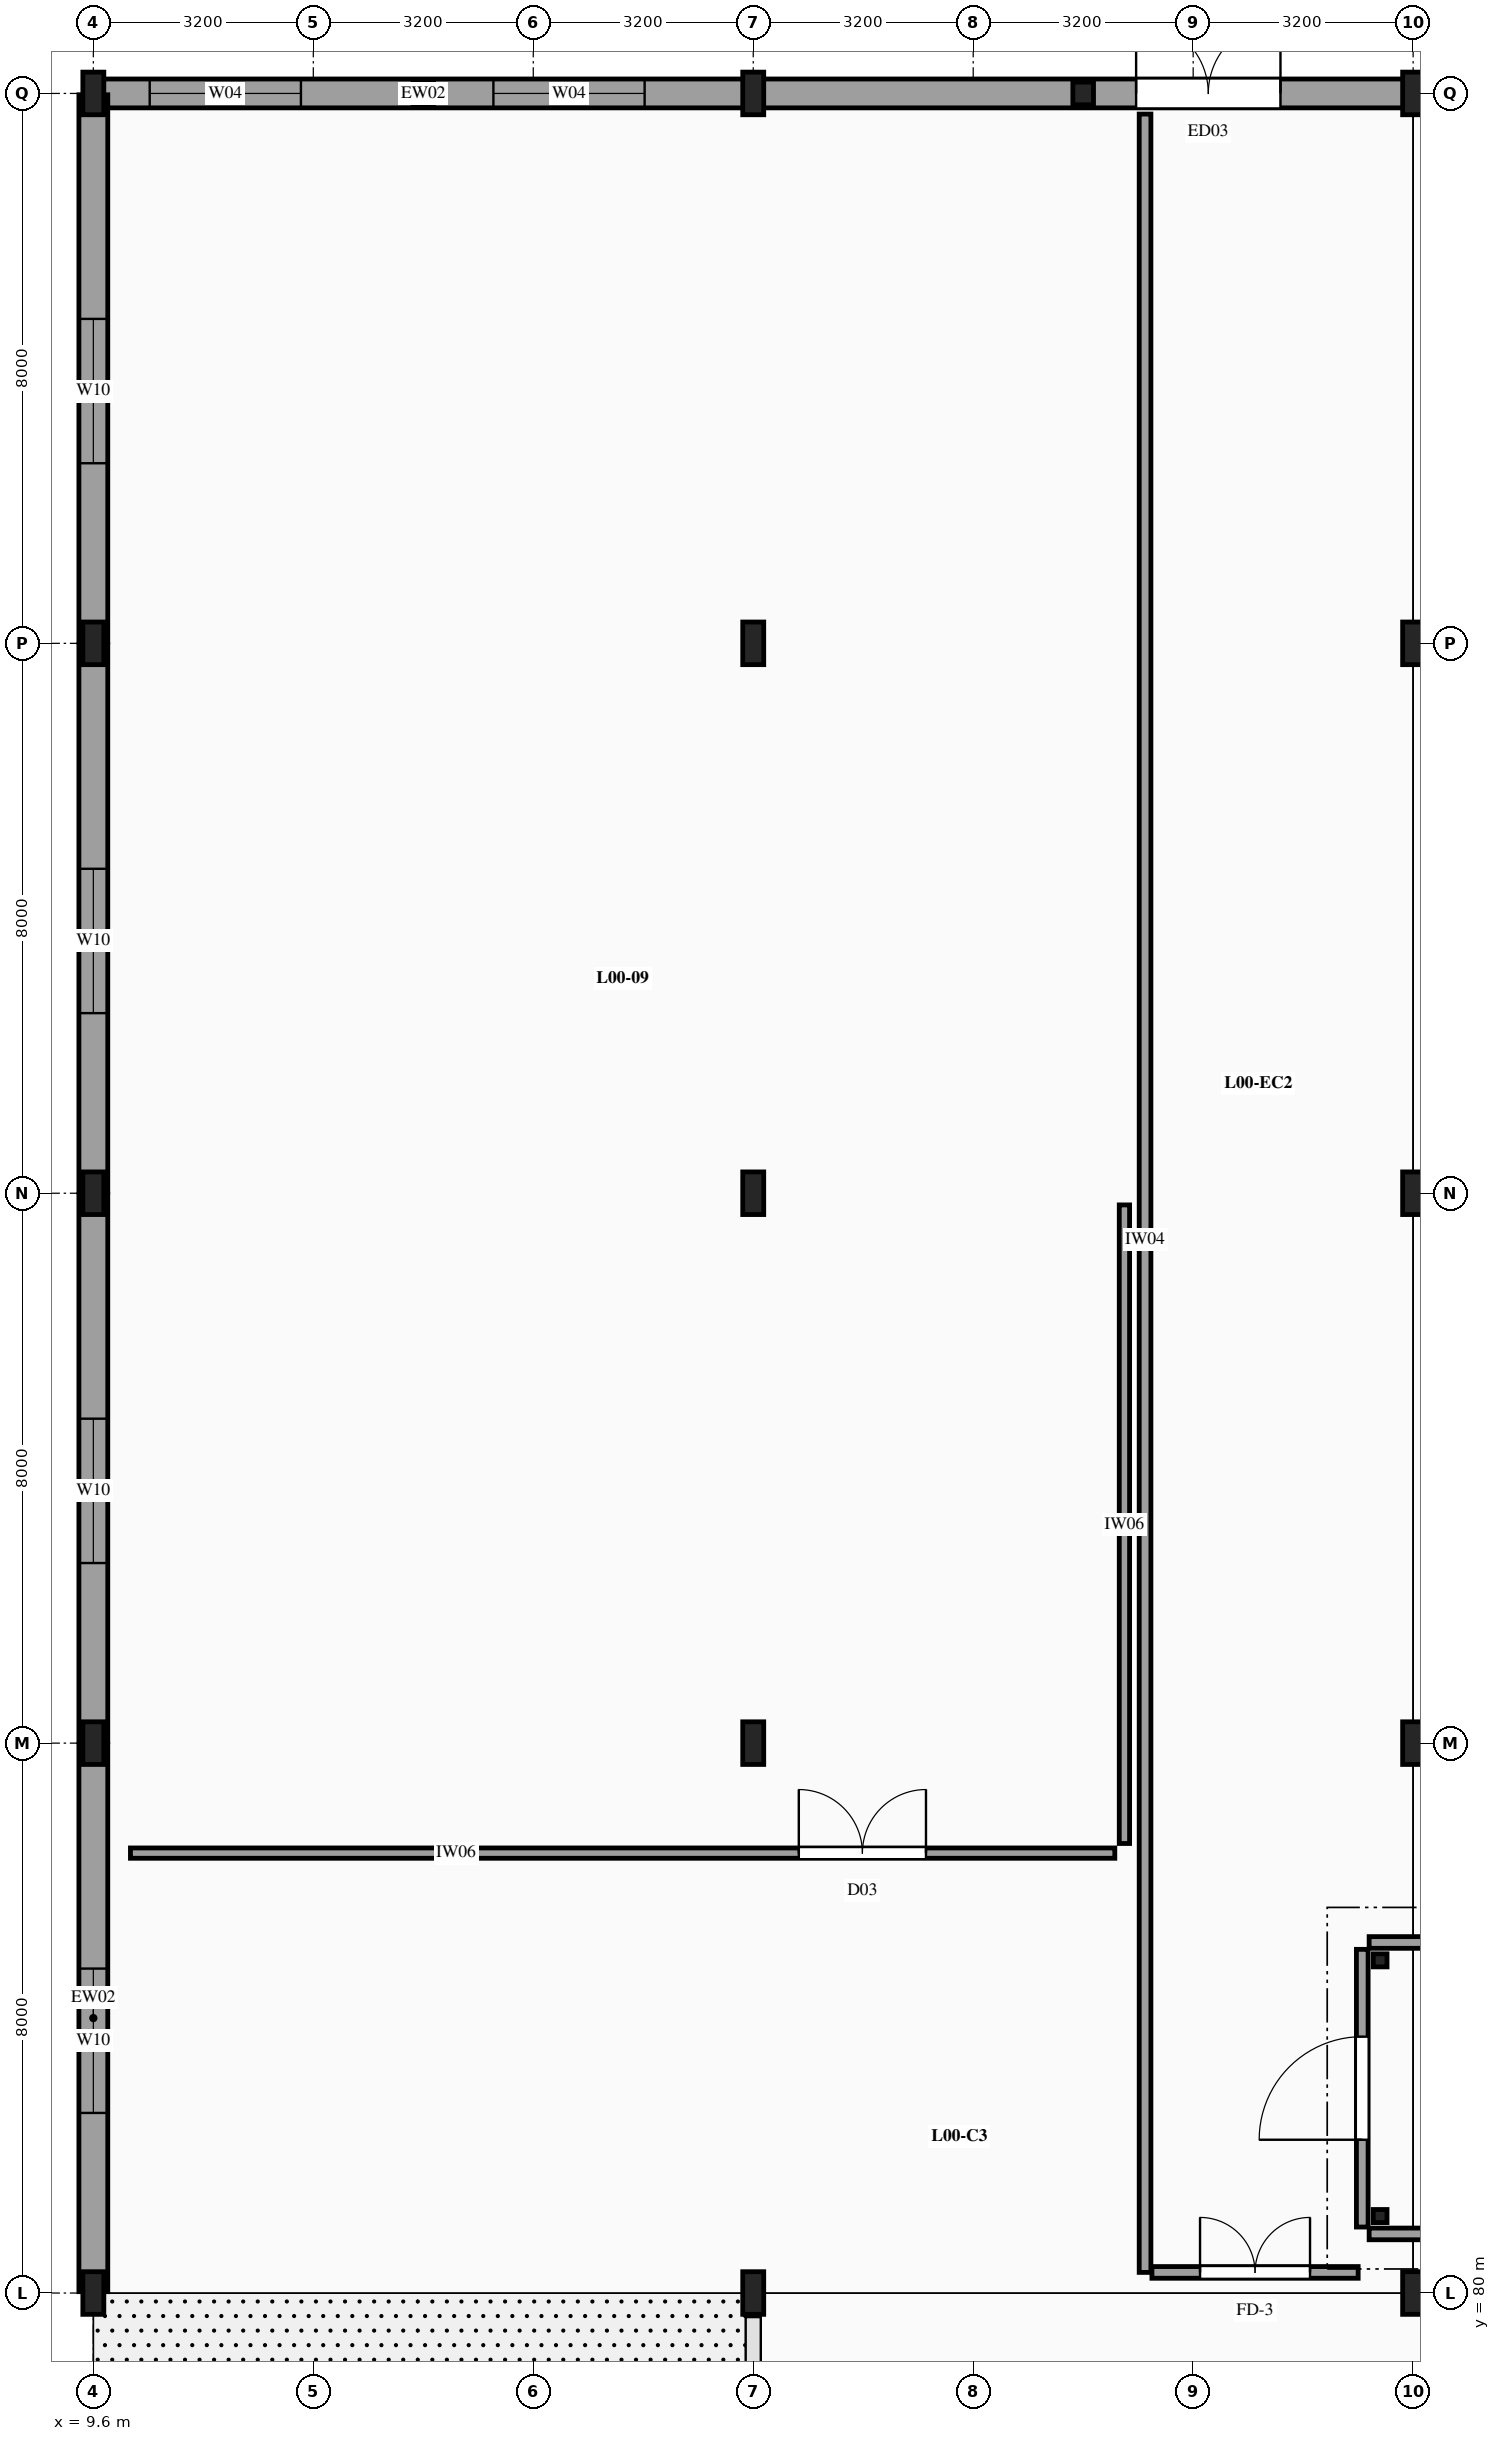
"""IFC4 building model, lengths in metres.
Left out: names, types, materials, properties, quantities, classifications, styles, units other than length and angle.
Written with IfcOpenShell. Run it as: python <this file> out.ifc"""

import sys

from ifc_helpers import new_model, si_unit, direction, frame, frame_2d, origin, origin_2d, place, context, subcontext, project, spatial, rectangle, i_section, extrude, element, fill, save


model = new_model("IFC4")
c1 = context("Model", 3, precision=1e-05, world=origin(), true_north=direction((0.0, 1.0)))
c2 = subcontext(c1, "Body", "Model", "MODEL_VIEW")
j1 = project(units=[si_unit("LENGTHUNIT", "METRE"), si_unit("PLANEANGLEUNIT", "RADIAN")], contexts=[c1])
p1 = place(None, origin())
s1 = spatial("IfcSite", under=j1, at=p1, CompositionType="ELEMENT")
p2 = place(p1, origin())
s2 = spatial("IfcBuilding", under=s1, at=p2, CompositionType="ELEMENT")
p3 = place(p2, origin())
s3 = spatial("IfcBuildingStorey", under=s2, at=p3, CompositionType="ELEMENT", Elevation=0.0)
for number, where, z_axis, x_axis in (
    (1, (9.6, 80.0, -0.28), (0.0, 0.0, 1.0), (1.0, 0.0, 0.0)),
    (2, (9.6, 88.0, -0.28), (0.0, 0.0, 1.0), (1.0, 0.0, 0.0)),
    (3, (9.6, 96.0, -0.28), (0.0, 0.0, 1.0), (1.0, 0.0, 0.0)),
    (4, (9.6, 104.0, -0.28), (0.0, 0.0, 1.0), (1.0, 0.0, 0.0)),
    (5, (9.6, 112.0, -0.28), (0.0, 0.0, 1.0), (1.0, 0.0, 0.0)),
    (6, (19.2, 80.0, -0.28), (0.0, 0.0, 1.0), (1.0, 0.0, 0.0)),
    (7, (19.2, 88.0, -0.28), (0.0, 0.0, 1.0), (1.0, 0.0, 0.0)),
    (8, (19.2, 96.0, -0.28), (0.0, 0.0, 1.0), (1.0, 0.0, 0.0)),
    (9, (19.2, 104.0, -0.28), (0.0, 0.0, 1.0), (1.0, 0.0, 0.0)),
    (10, (19.2, 112.0, -0.28), (0.0, 0.0, 1.0), (1.0, 0.0, 0.0)),
    (11, (28.8, 80.0, -0.28), (0.0, 0.0, 1.0), (1.0, 0.0, 0.0)),
    (12, (28.8, 88.0, -0.28), (0.0, 0.0, 1.0), (1.0, 0.0, 0.0)),
    (13, (28.8, 96.0, -0.28), (0.0, 0.0, 1.0), (1.0, 0.0, 0.0)),
    (14, (28.8, 104.0, -0.28), (0.0, 0.0, 1.0), (1.0, 0.0, 0.0)),
    (15, (28.8, 112.0, -0.28), (0.0, 0.0, 1.0), (1.0, 0.0, 0.0)),
):
    element("IfcColumn", number, at=place(p3, frame(where, z_axis=z_axis, x_axis=x_axis)), inside=s3, PredefinedType="COLUMN", context=c2, shape_type="SweptSolid", body=[
        extrude(i_section(OverallWidth=0.305, OverallDepth=0.62, WebThickness=0.021, FlangeThickness=0.04, FilletRadius=0.027, at=origin_2d()), origin(), (0.0, 0.0, 1.0), 4.52),
    ])
for number, where, z_axis, x_axis in (
    (16, (14.4, 112.0, -0.28), (0.0, 0.0, 1.0), (1.0, 0.0, 0.0)),
    (17, (24.0, 112.0, -0.28), (0.0, 0.0, 1.0), (1.0, 0.0, 0.0)),
):
    element("IfcColumn", number, at=place(p3, frame(where, z_axis=z_axis, x_axis=x_axis)), inside=s3, PredefinedType="PILASTER", context=c2, shape_type="SweptSolid", body=[
        extrude(i_section(OverallWidth=0.3, OverallDepth=0.33, WebThickness=0.01, FlangeThickness=0.017, FilletRadius=0.027, at=origin_2d()), origin(), (0.0, 0.0, 1.0), 4.52),
    ])
for number, where, z_axis, x_axis in (
    (18, (28.32, 81.12, 0.0), (0.0, 0.0, 1.0), (1.0, 0.0, 0.0)),
    (19, (28.32, 84.84, 0.0), (0.0, 0.0, 1.0), (1.0, 0.0, 0.0)),
):
    element("IfcColumn", number, at=place(p3, frame(where, z_axis=z_axis, x_axis=x_axis)), inside=s3, PredefinedType="COLUMN", context=c2, shape_type="SweptSolid", body=[
        extrude(i_section(OverallWidth=0.2, OverallDepth=0.19, WebThickness=0.007, FlangeThickness=0.01, FilletRadius=0.018, at=origin_2d()), origin(), (0.0, 0.0, 1.0), 4.5),
    ])
p4 = place(p3, frame((9.62, 112.0, 0.0), z_axis=(0.0, 0.0, 1.0), x_axis=(1.0, 0.0, 0.0)))
e20 = element("IfcWall", 20, at=p4, inside=s3, PredefinedType="SOLIDWALL", context=c2, shape_type="SweptSolid", body=[
    extrude(rectangle(XDim=9.56, YDim=0.42, at=frame_2d((4.78, 0.0))), origin(), (0.0, 0.0, 1.0), 3.56),
])
p5 = place(p4, frame((0.8, 0.0, 0.72)))
e21 = element("IfcOpeningElement", 21, at=p5, cuts=e20, PredefinedType="OPENING", context=c2, shape_type="SweptSolid", body=[
    extrude(rectangle(XDim=2.2, YDim=2.6, at=frame_2d((1.1, 1.3))), frame((0.0, 0.22, 0.0), z_axis=(0.0, -1.0, 0.0), x_axis=(1.0, 0.0, 0.0)), (0.0, 0.0, 1.0), 0.44),
])
p6 = place(p4, frame((5.8, 0.0, 0.72)))
e22 = element("IfcOpeningElement", 22, at=p6, cuts=e20, PredefinedType="OPENING", context=c2, shape_type="SweptSolid", body=[
    extrude(rectangle(XDim=2.2, YDim=2.6, at=frame_2d((1.1, 1.3))), frame((0.0, 0.22, 0.0), z_axis=(0.0, -1.0, 0.0), x_axis=(1.0, 0.0, 0.0)), (0.0, 0.0, 1.0), 0.44),
])
p7 = place(p3, frame((19.22, 112.0, 0.0), z_axis=(0.0, 0.0, 1.0), x_axis=(1.0, 0.0, 0.0)))
e23 = element("IfcWall", 23, at=p7, inside=s3, PredefinedType="SOLIDWALL", context=c2, shape_type="SweptSolid", body=[
    extrude(rectangle(XDim=9.56, YDim=0.42, at=frame_2d((4.78, 0.0))), origin(), (0.0, 0.0, 1.0), 3.56),
])
p8 = place(p7, frame((5.55, 0.0, 0.0)))
e24 = element("IfcOpeningElement", 24, at=p8, cuts=e23, PredefinedType="OPENING", context=c2, shape_type="SweptSolid", body=[
    extrude(rectangle(XDim=2.1, YDim=2.4, at=frame_2d((1.05, 1.2))), frame((0.0, 0.22, 0.0), z_axis=(0.0, -1.0, 0.0), x_axis=(1.0, 0.0, 0.0)), (0.0, 0.0, 1.0), 0.44),
])
p9 = place(p3, frame((28.82, 112.0, 0.0), z_axis=(0.0, 0.0, 1.0), x_axis=(1.0, 0.0, 0.0)))
e25 = element("IfcWall", 25, at=p9, inside=s3, PredefinedType="SOLIDWALL", context=c2, shape_type="SweptSolid", body=[
    extrude(rectangle(XDim=9.56, YDim=0.42, at=frame_2d((4.78, 0.0))), origin(), (0.0, 0.0, 1.0), 3.56),
])
p10 = place(p9, frame((3.3, 0.0, 0.0)))
e26 = element("IfcOpeningElement", 26, at=p10, cuts=e25, PredefinedType="OPENING", context=c2, shape_type="SweptSolid", body=[
    extrude(rectangle(XDim=2.3, YDim=2.4, at=frame_2d((1.15, 1.2))), frame((0.0, 0.22, 0.0), z_axis=(0.0, -1.0, 0.0), x_axis=(1.0, 0.0, 0.0)), (0.0, 0.0, 1.0), 0.44),
])
p11 = place(p3, frame((9.6, 80.02, 0.0), z_axis=(0.0, 0.0, 1.0), x_axis=(0.0, 1.0, 0.0)))
e27 = element("IfcWall", 27, at=p11, inside=s3, PredefinedType="SOLIDWALL", context=c2, shape_type="SweptSolid", body=[
    extrude(rectangle(XDim=7.96, YDim=0.42, at=frame_2d((3.98, 0.0))), origin(), (0.0, 0.0, 1.0), 3.56),
])
p12 = place(p11, frame((2.6, 0.0, 0.9)))
e28 = element("IfcOpeningElement", 28, at=p12, cuts=e27, PredefinedType="OPENING", context=c2, shape_type="SweptSolid", body=[
    extrude(rectangle(XDim=2.1, YDim=2.1, at=frame_2d((1.05, 1.05))), frame((0.0, 0.22, 0.0), z_axis=(0.0, -1.0, 0.0), x_axis=(1.0, 0.0, 0.0)), (0.0, 0.0, 1.0), 0.44),
])
p13 = place(p3, frame((9.6, 88.02, 0.0), z_axis=(0.0, 0.0, 1.0), x_axis=(0.0, 1.0, 0.0)))
e29 = element("IfcWall", 29, at=p13, inside=s3, PredefinedType="SOLIDWALL", context=c2, shape_type="SweptSolid", body=[
    extrude(rectangle(XDim=7.96, YDim=0.42, at=frame_2d((3.98, 0.0))), origin(), (0.0, 0.0, 1.0), 3.56),
])
p14 = place(p13, frame((2.6, 0.0, 0.9)))
e30 = element("IfcOpeningElement", 30, at=p14, cuts=e29, PredefinedType="OPENING", context=c2, shape_type="SweptSolid", body=[
    extrude(rectangle(XDim=2.1, YDim=2.1, at=frame_2d((1.05, 1.05))), frame((0.0, 0.22, 0.0), z_axis=(0.0, -1.0, 0.0), x_axis=(1.0, 0.0, 0.0)), (0.0, 0.0, 1.0), 0.44),
])
p15 = place(p3, frame((9.6, 96.02, 0.0), z_axis=(0.0, 0.0, 1.0), x_axis=(0.0, 1.0, 0.0)))
e31 = element("IfcWall", 31, at=p15, inside=s3, PredefinedType="SOLIDWALL", context=c2, shape_type="SweptSolid", body=[
    extrude(rectangle(XDim=7.96, YDim=0.42, at=frame_2d((3.98, 0.0))), origin(), (0.0, 0.0, 1.0), 3.56),
])
p16 = place(p15, frame((2.6, 0.0, 0.9)))
e32 = element("IfcOpeningElement", 32, at=p16, cuts=e31, PredefinedType="OPENING", context=c2, shape_type="SweptSolid", body=[
    extrude(rectangle(XDim=2.1, YDim=2.1, at=frame_2d((1.05, 1.05))), frame((0.0, 0.22, 0.0), z_axis=(0.0, -1.0, 0.0), x_axis=(1.0, 0.0, 0.0)), (0.0, 0.0, 1.0), 0.44),
])
p17 = place(p3, frame((9.6, 104.02, 0.0), z_axis=(0.0, 0.0, 1.0), x_axis=(0.0, 1.0, 0.0)))
e33 = element("IfcWall", 33, at=p17, inside=s3, PredefinedType="SOLIDWALL", context=c2, shape_type="SweptSolid", body=[
    extrude(rectangle(XDim=7.96, YDim=0.42, at=frame_2d((3.98, 0.0))), origin(), (0.0, 0.0, 1.0), 3.56),
])
p18 = place(p17, frame((2.6, 0.0, 0.9)))
e34 = element("IfcOpeningElement", 34, at=p18, cuts=e33, PredefinedType="OPENING", context=c2, shape_type="SweptSolid", body=[
    extrude(rectangle(XDim=2.1, YDim=2.1, at=frame_2d((1.05, 1.05))), frame((0.0, 0.22, 0.0), z_axis=(0.0, -1.0, 0.0), x_axis=(1.0, 0.0, 0.0)), (0.0, 0.0, 1.0), 0.44),
])
p19 = place(p3, frame((28.06, 80.96, 0.0), z_axis=(0.0, 0.0, 1.0), x_axis=(0.0, 1.0, 0.0)))
e35 = element("IfcWall", 35, at=p19, inside=s3, PredefinedType="SOLIDWALL", context=c2, shape_type="SweptSolid", body=[
    extrude(rectangle(XDim=4.04, YDim=0.17, at=frame_2d((2.02, 0.0))), origin(), (0.0, 0.0, 1.0), 3.6),
])
p20 = place(p19, frame((1.27, 0.0, 0.0)))
e36 = element("IfcOpeningElement", 36, at=p20, cuts=e35, PredefinedType="OPENING", context=c2, shape_type="SweptSolid", body=[
    extrude(rectangle(XDim=1.5, YDim=2.2, at=frame_2d((0.75, 1.1))), frame((0.0, 0.095, 0.0), z_axis=(0.0, -1.0, 0.0), x_axis=(1.0, 0.0, 0.0)), (0.0, 0.0, 1.0), 0.19),
])
for number, where, z_axis, x_axis in (
    (37, (28.16, 80.86, 0.0), (0.0, 0.0, 1.0), (1.0, 0.0, 0.0)),
    (38, (28.16, 85.1, 0.0), (0.0, 0.0, 1.0), (1.0, 0.0, 0.0)),
):
    element("IfcWall", number, at=place(p3, frame(where, z_axis=z_axis, x_axis=x_axis)), inside=s3, PredefinedType="SOLIDWALL", context=c2, shape_type="SweptSolid", body=[
        extrude(rectangle(XDim=10.0, YDim=0.17, at=frame_2d((5.0, 0.0))), origin(), (0.0, 0.0, 1.0), 3.6),
    ])
p21 = place(p3, frame((24.9, 80.3, 0.0), z_axis=(0.0, 0.0, 1.0), x_axis=(0.0, 1.0, 0.0)))
e39 = element("IfcWall", 39, at=p21, inside=s3, PredefinedType="SOLIDWALL", context=c2, shape_type="SweptSolid", body=[
    extrude(rectangle(XDim=31.4, YDim=0.17, at=frame_2d((15.7, 0.0))), origin(), (0.0, 0.0, 1.0), 3.6),
])
p22 = place(p3, frame((25.0, 80.3, 0.0), z_axis=(0.0, 0.0, 1.0), x_axis=(1.0, 0.0, 0.0)))
e40 = element("IfcWall", 40, at=p22, inside=s3, PredefinedType="SOLIDWALL", context=c2, shape_type="SweptSolid", body=[
    extrude(rectangle(XDim=3.0, YDim=0.17, at=frame_2d((1.5, 0.0))), origin(), (0.0, 0.0, 1.0), 3.6),
])
p23 = place(p22, frame((0.7, 0.0, 0.0)))
e41 = element("IfcOpeningElement", 41, at=p23, cuts=e40, PredefinedType="OPENING", context=c2, shape_type="SweptSolid", body=[
    extrude(rectangle(XDim=1.6, YDim=2.25, at=frame_2d((0.8, 1.125))), frame((0.0, 0.095, 0.0), z_axis=(0.0, -1.0, 0.0), x_axis=(1.0, 0.0, 0.0)), (0.0, 0.0, 1.0), 0.19),
])
p24 = place(p3, frame((10.14, 86.4, 0.0), z_axis=(0.0, 0.0, 1.0), x_axis=(1.0, 0.0, 0.0)))
e42 = element("IfcWall", 42, at=p24, inside=s3, PredefinedType="PARTITIONING", context=c2, shape_type="SweptSolid", body=[
    extrude(rectangle(XDim=14.32, YDim=0.15, at=frame_2d((7.16, 0.0))), origin(), (0.0, 0.0, 1.0), 3.6),
])
p25 = place(p24, frame((9.723, 0.0, 0.0)))
e43 = element("IfcOpeningElement", 43, at=p25, cuts=e42, PredefinedType="OPENING", context=c2, shape_type="SweptSolid", body=[
    extrude(rectangle(XDim=1.85, YDim=2.5, at=frame_2d((0.925, 1.25))), frame((0.0, 0.085, 0.0), z_axis=(0.0, -1.0, 0.0), x_axis=(1.0, 0.0, 0.0)), (0.0, 0.0, 1.0), 0.17),
])
p26 = place(p3, frame((24.6, 86.54, 0.0), z_axis=(0.0, 0.0, 1.0), x_axis=(0.0, 1.0, 0.0)))
e44 = element("IfcWall", 44, at=p26, inside=s3, PredefinedType="PARTITIONING", context=c2, shape_type="SweptSolid", body=[
    extrude(rectangle(XDim=9.29, YDim=0.15, at=frame_2d((4.645, 0.0))), origin(), (0.0, 0.0, 1.0), 3.6),
])
p27 = place(p5, origin())
e45 = element("IfcWindow", 45, at=p27, inside=s3, PartitioningType="SINGLE_PANEL", PredefinedType="WINDOW", context=c2, shape_type="SweptSolid", body=[
    extrude(rectangle(XDim=2.2, YDim=2.6, at=frame_2d((1.1, 1.3))), frame((0.0, 0.03, 0.0), z_axis=(0.0, -1.0, 0.0), x_axis=(1.0, 0.0, 0.0)), (0.0, 0.0, 1.0), 0.06),
])
fill(e21, e45)
p28 = place(p6, origin())
e46 = element("IfcWindow", 46, at=p28, inside=s3, PartitioningType="SINGLE_PANEL", PredefinedType="WINDOW", context=c2, shape_type="SweptSolid", body=[
    extrude(rectangle(XDim=2.2, YDim=2.6, at=frame_2d((1.1, 1.3))), frame((0.0, 0.03, 0.0), z_axis=(0.0, -1.0, 0.0), x_axis=(1.0, 0.0, 0.0)), (0.0, 0.0, 1.0), 0.06),
])
fill(e22, e46)
p29 = place(p8, origin())
e47 = element("IfcDoor", 47, at=p29, inside=s3, OperationType="DOUBLE_DOOR_SINGLE_SWING", PredefinedType="DOOR", context=c2, shape_type="SweptSolid", body=[
    extrude(rectangle(XDim=2.1, YDim=2.4, at=frame_2d((1.05, 1.2))), frame((0.0, 0.025, 0.0), z_axis=(0.0, -1.0, 0.0), x_axis=(1.0, 0.0, 0.0)), (0.0, 0.0, 1.0), 0.05),
])
fill(e24, e47)
p30 = place(p12, origin())
e48 = element("IfcWindow", 48, at=p30, inside=s3, PartitioningType="SINGLE_PANEL", PredefinedType="WINDOW", context=c2, shape_type="SweptSolid", body=[
    extrude(rectangle(XDim=2.1, YDim=2.1, at=frame_2d((1.05, 1.05))), frame((0.0, 0.03, 0.0), z_axis=(0.0, -1.0, 0.0), x_axis=(1.0, 0.0, 0.0)), (0.0, 0.0, 1.0), 0.06),
])
fill(e28, e48)
p31 = place(p14, origin())
e49 = element("IfcWindow", 49, at=p31, inside=s3, PartitioningType="SINGLE_PANEL", PredefinedType="WINDOW", context=c2, shape_type="SweptSolid", body=[
    extrude(rectangle(XDim=2.1, YDim=2.1, at=frame_2d((1.05, 1.05))), frame((0.0, 0.03, 0.0), z_axis=(0.0, -1.0, 0.0), x_axis=(1.0, 0.0, 0.0)), (0.0, 0.0, 1.0), 0.06),
])
fill(e30, e49)
p32 = place(p16, origin())
e50 = element("IfcWindow", 50, at=p32, inside=s3, PartitioningType="SINGLE_PANEL", PredefinedType="WINDOW", context=c2, shape_type="SweptSolid", body=[
    extrude(rectangle(XDim=2.1, YDim=2.1, at=frame_2d((1.05, 1.05))), frame((0.0, 0.03, 0.0), z_axis=(0.0, -1.0, 0.0), x_axis=(1.0, 0.0, 0.0)), (0.0, 0.0, 1.0), 0.06),
])
fill(e32, e50)
p33 = place(p18, origin())
e51 = element("IfcWindow", 51, at=p33, inside=s3, PartitioningType="SINGLE_PANEL", PredefinedType="WINDOW", context=c2, shape_type="SweptSolid", body=[
    extrude(rectangle(XDim=2.1, YDim=2.1, at=frame_2d((1.05, 1.05))), frame((0.0, 0.03, 0.0), z_axis=(0.0, -1.0, 0.0), x_axis=(1.0, 0.0, 0.0)), (0.0, 0.0, 1.0), 0.06),
])
fill(e34, e51)
p34 = place(p20, origin())
e52 = element("IfcDoor", 52, at=p34, inside=s3, OperationType="SINGLE_SWING_LEFT", PredefinedType="DOOR", context=c2, shape_type="SweptSolid", body=[
    extrude(rectangle(XDim=1.5, YDim=2.2, at=frame_2d((0.75, 1.1))), frame((0.0, 0.025, 0.0), z_axis=(0.0, -1.0, 0.0), x_axis=(1.0, 0.0, 0.0)), (0.0, 0.0, 1.0), 0.05),
])
fill(e36, e52)
p35 = place(p23, origin())
e53 = element("IfcDoor", 53, at=p35, inside=s3, OperationType="DOUBLE_DOOR_SINGLE_SWING", PredefinedType="DOOR", context=c2, shape_type="SweptSolid", body=[
    extrude(rectangle(XDim=1.6, YDim=2.25, at=frame_2d((0.8, 1.125))), frame((0.0, 0.025, 0.0), z_axis=(0.0, -1.0, 0.0), x_axis=(1.0, 0.0, 0.0)), (0.0, 0.0, 1.0), 0.05),
])
fill(e41, e53)
p36 = place(p25, origin())
e54 = element("IfcDoor", 54, at=p36, inside=s3, OperationType="DOUBLE_DOOR_SINGLE_SWING", PredefinedType="DOOR", context=c2, shape_type="SweptSolid", body=[
    extrude(rectangle(XDim=1.85, YDim=2.5, at=frame_2d((0.925, 1.25))), frame((0.0, 0.025, 0.0), z_axis=(0.0, -1.0, 0.0), x_axis=(1.0, 0.0, 0.0)), (0.0, 0.0, 1.0), 0.05),
])
fill(e43, e54)
save(model, sys.argv[1])
